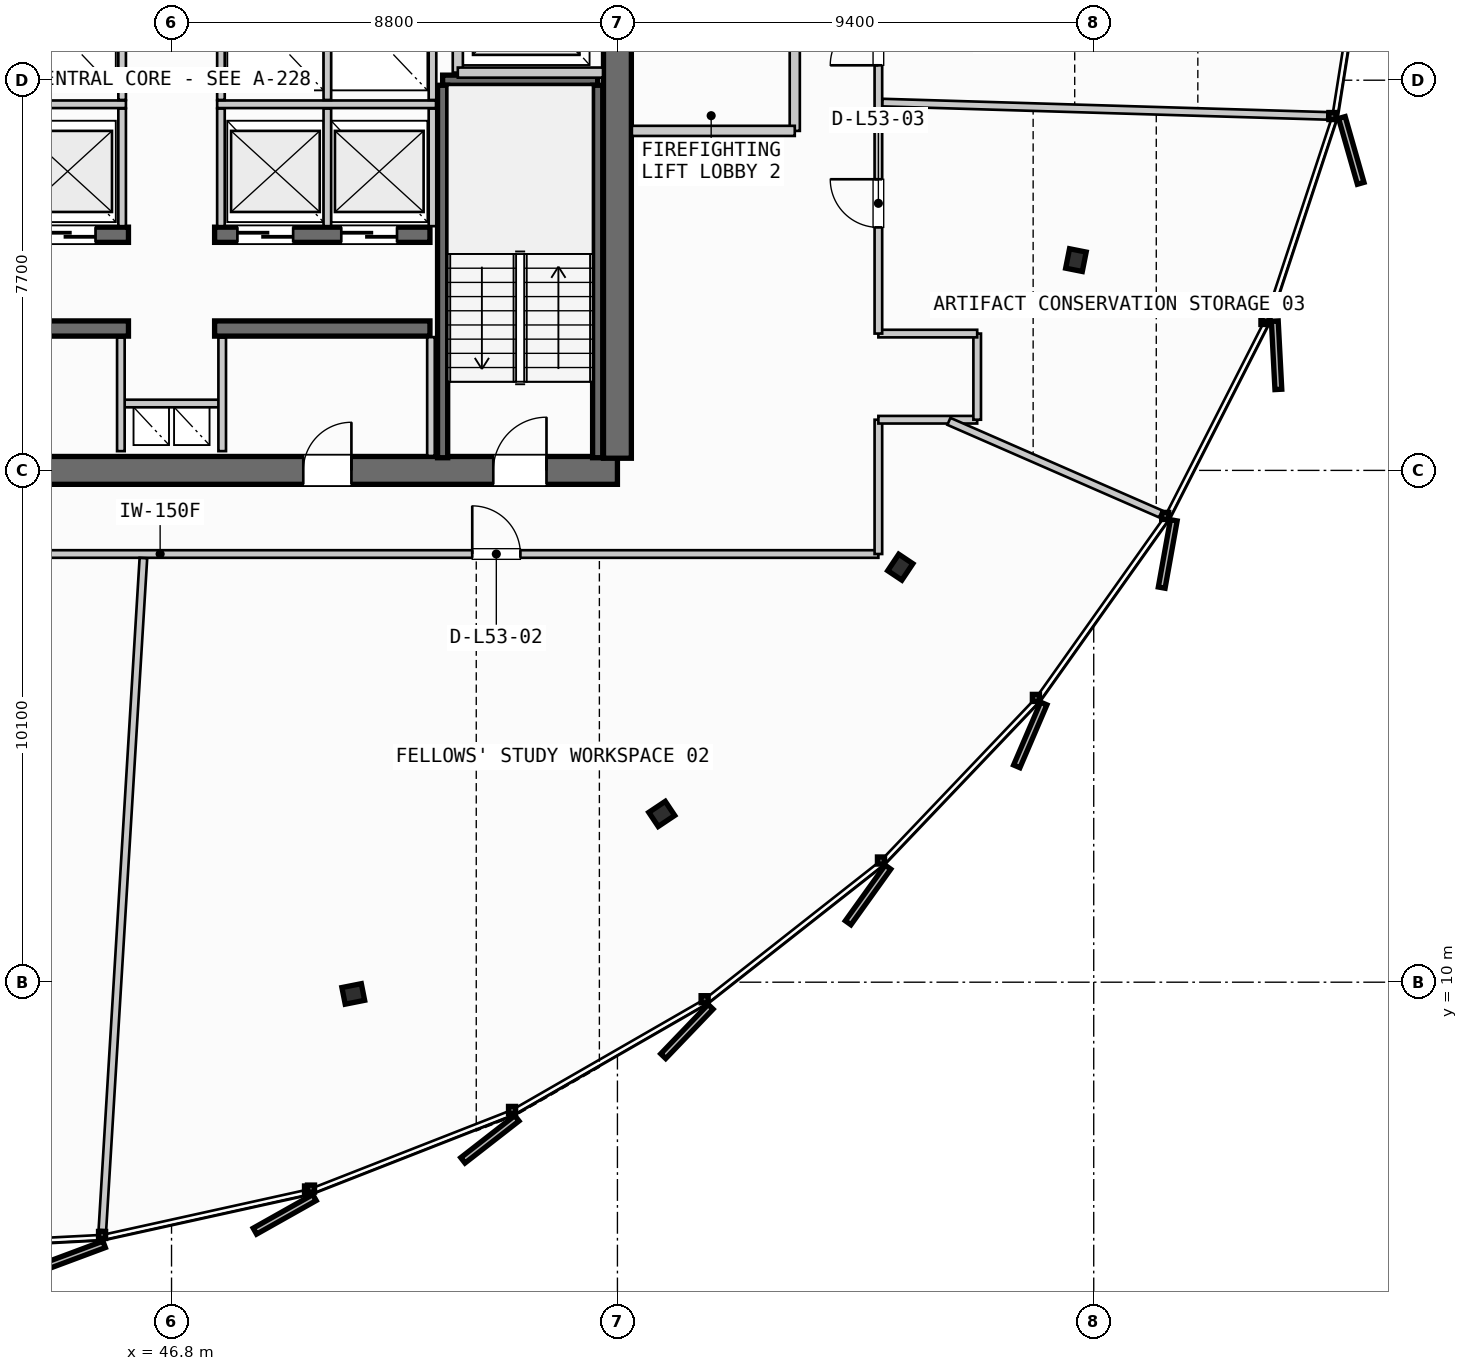
"""IFC4 building model, lengths in metres.
Left out: names, types, materials, properties, quantities, classifications, styles, units other than length and angle.
Written with IfcOpenShell. Run it as: python <this file> out.ifc"""

import sys

from ifc_helpers import new_model, si_unit, direction, frame, frame_2d, origin, origin_2d, place, context, subcontext, project, spatial, rectangle, i_section, extrude, source, transform, mapped, element, fill, save


model = new_model("IFC4")
c1 = context("Model", 3, precision=1e-05, world=origin(), true_north=direction((0.0, 1.0)))
c2 = subcontext(c1, "Body", "Model", "MODEL_VIEW")
j1 = project(units=[si_unit("LENGTHUNIT", "METRE"), si_unit("PLANEANGLEUNIT", "RADIAN")], contexts=[c1])
p1 = place(None, origin())
s1 = spatial("IfcSite", under=j1, at=p1, CompositionType="ELEMENT")
p2 = place(p1, origin())
s2 = spatial("IfcBuilding", under=s1, at=p2, CompositionType="ELEMENT")
p3 = place(p2, frame((0.0, 0.0, 204.4)))
s3 = spatial("IfcBuildingStorey", under=s2, at=p3, CompositionType="ELEMENT", Elevation=204.4)
p4 = place(p3, frame((38.0, 20.1, 0.0), z_axis=(0.0, 0.0, 1.0), x_axis=(1.0, 0.0, 0.0)))
e1 = element("IfcWall", 1, at=p4, inside=s3, PredefinedType="SHEAR", context=c2, shape_type="SweptSolid", body=[
    extrude(rectangle(XDim=17.6, YDim=0.55, at=frame_2d((8.8, 0.0))), origin(), (0.0, 0.0, 1.0), 3.26),
])
p5 = place(p4, frame((1.4, 0.0, 0.0)))
e2 = element("IfcOpeningElement", 2, at=p5, cuts=e1, PredefinedType="OPENING", context=c2, shape_type="SweptSolid", body=[
    extrude(rectangle(XDim=1.05, YDim=2.15, at=frame_2d((0.525, 1.075))), frame((0.0, 0.285, 0.0), z_axis=(0.0, -1.0, 0.0), x_axis=(1.0, 0.0, 0.0)), (0.0, 0.0, 1.0), 0.57),
])
p6 = place(p4, frame((15.15, 0.0, 0.0)))
e3 = element("IfcOpeningElement", 3, at=p6, cuts=e1, PredefinedType="OPENING", context=c2, shape_type="SweptSolid", body=[
    extrude(rectangle(XDim=1.05, YDim=2.15, at=frame_2d((0.525, 1.075))), frame((0.0, 0.285, 0.0), z_axis=(0.0, -1.0, 0.0), x_axis=(1.0, 0.0, 0.0)), (0.0, 0.0, 1.0), 0.57),
])
p7 = place(p4, frame((5.25, 0.0, 0.0)))
e4 = element("IfcOpeningElement", 4, at=p7, cuts=e1, PredefinedType="OPENING", context=c2, shape_type="SweptSolid", body=[
    extrude(rectangle(XDim=0.95, YDim=2.15, at=frame_2d((0.475, 1.075))), frame((0.0, 0.285, 0.0), z_axis=(0.0, -1.0, 0.0), x_axis=(1.0, 0.0, 0.0)), (0.0, 0.0, 1.0), 0.57),
])
p8 = place(p4, frame((11.4, 0.0, 0.0)))
e5 = element("IfcOpeningElement", 5, at=p8, cuts=e1, PredefinedType="OPENING", context=c2, shape_type="SweptSolid", body=[
    extrude(rectangle(XDim=0.95, YDim=2.15, at=frame_2d((0.475, 1.075))), frame((0.0, 0.285, 0.0), z_axis=(0.0, -1.0, 0.0), x_axis=(1.0, 0.0, 0.0)), (0.0, 0.0, 1.0), 0.57),
])
p9 = place(p3, frame((55.6, 20.34, 0.0), z_axis=(0.0, 0.0, 1.0), x_axis=(0.0, 1.0, 0.0)))
e6 = element("IfcWall", 6, at=p9, inside=s3, PredefinedType="SHEAR", context=c2, shape_type="SweptSolid", body=[
    extrude(rectangle(XDim=14.92, YDim=0.55, at=frame_2d((7.46, 0.0))), origin(), (0.0, 0.0, 1.0), 3.26),
])
p10 = place(p9, frame((12.71, 0.0, 0.0)))
e7 = element("IfcOpeningElement", 7, at=p10, cuts=e6, PredefinedType="OPENING", context=c2, shape_type="SweptSolid", body=[
    extrude(rectangle(XDim=1.05, YDim=2.15, at=frame_2d((0.525, 1.075))), frame((0.0, 0.285, 0.0), z_axis=(0.0, -1.0, 0.0), x_axis=(1.0, 0.0, 0.0)), (0.0, 0.0, 1.0), 0.57),
])
p11 = place(p9, frame((8.61, 0.0, 0.0)))
e8 = element("IfcOpeningElement", 8, at=p11, cuts=e6, PredefinedType="OPENING", context=c2, shape_type="SweptSolid", body=[
    extrude(rectangle(XDim=1.1, YDim=2.2, at=frame_2d((0.55, 1.1))), frame((0.0, 0.285, 0.0), z_axis=(0.0, -1.0, 0.0), x_axis=(1.0, 0.0, 0.0)), (0.0, 0.0, 1.0), 0.57),
])
for number, where, z_axis, x_axis in (
    (9, (41.7, 22.9, 0.0), (0.0, 0.0, 1.0), (1.0, 0.0, 0.0)),
    (10, (47.65, 22.9, 0.0), (0.0, 0.0, 1.0), (1.0, 0.0, 0.0)),
):
    element("IfcWall", number, at=place(p3, frame(where, z_axis=z_axis, x_axis=x_axis)), inside=s3, PredefinedType="SHEAR", context=c2, shape_type="SweptSolid", body=[
        extrude(rectangle(XDim=4.25, YDim=0.3, at=frame_2d((2.125, 0.0))), origin(), (0.0, 0.0, 1.0), 3.26),
    ])
p12 = place(p3, frame((41.7, 24.75, 0.0), z_axis=(0.0, 0.0, 1.0), x_axis=(1.0, 0.0, 0.0)))
e11 = element("IfcWall", 11, at=p12, inside=s3, PredefinedType="SHEAR", context=c2, shape_type="SweptSolid", body=[
    extrude(rectangle(XDim=4.25, YDim=0.3, at=frame_2d((2.125, 0.0))), origin(), (0.0, 0.0, 1.0), 3.26),
])
p13 = place(p12, frame((0.45, 0.0, 0.0)))
e12 = element("IfcOpeningElement", 12, at=p13, cuts=e11, PredefinedType="OPENING", context=c2, shape_type="SweptSolid", body=[
    extrude(rectangle(XDim=1.1, YDim=2.2, at=frame_2d((0.55, 1.1))), frame((0.0, 0.16, 0.0), z_axis=(0.0, -1.0, 0.0), x_axis=(1.0, 0.0, 0.0)), (0.0, 0.0, 1.0), 0.32),
])
p14 = place(p12, frame((2.5, 0.0, 0.0)))
e13 = element("IfcOpeningElement", 13, at=p14, cuts=e11, PredefinedType="OPENING", context=c2, shape_type="SweptSolid", body=[
    extrude(rectangle(XDim=1.1, YDim=2.2, at=frame_2d((0.55, 1.1))), frame((0.0, 0.16, 0.0), z_axis=(0.0, -1.0, 0.0), x_axis=(1.0, 0.0, 0.0)), (0.0, 0.0, 1.0), 0.32),
])
p15 = place(p3, frame((47.65, 24.75, 0.0), z_axis=(0.0, 0.0, 1.0), x_axis=(1.0, 0.0, 0.0)))
e14 = element("IfcWall", 14, at=p15, inside=s3, PredefinedType="SHEAR", context=c2, shape_type="SweptSolid", body=[
    extrude(rectangle(XDim=4.25, YDim=0.3, at=frame_2d((2.125, 0.0))), origin(), (0.0, 0.0, 1.0), 3.26),
])
p16 = place(p15, frame((0.45, 0.0, 0.0)))
e15 = element("IfcOpeningElement", 15, at=p16, cuts=e14, PredefinedType="OPENING", context=c2, shape_type="SweptSolid", body=[
    extrude(rectangle(XDim=1.1, YDim=2.2, at=frame_2d((0.55, 1.1))), frame((0.0, 0.16, 0.0), z_axis=(0.0, -1.0, 0.0), x_axis=(1.0, 0.0, 0.0)), (0.0, 0.0, 1.0), 0.32),
])
p17 = place(p15, frame((2.5, 0.0, 0.0)))
e16 = element("IfcOpeningElement", 16, at=p17, cuts=e14, PredefinedType="OPENING", context=c2, shape_type="SweptSolid", body=[
    extrude(rectangle(XDim=1.1, YDim=2.2, at=frame_2d((0.55, 1.1))), frame((0.0, 0.16, 0.0), z_axis=(0.0, -1.0, 0.0), x_axis=(1.0, 0.0, 0.0)), (0.0, 0.0, 1.0), 0.32),
])
m1 = source(origin(), c2, "Body", "SweptSolid", [
    extrude(i_section(OverallWidth=0.391, OverallDepth=0.335, WebThickness=0.023, FlangeThickness=0.034, FilletRadius=0.015, at=origin_2d()), origin(), (0.0, 0.0, 1.0), 3.26),
])
for number, where, z_axis, x_axis in (
    (17, (50.387, 9.769, 0.0), (0.0, 0.0, 1.0), (0.195, -0.981, 0.0)),
    (18, (56.475, 13.321, 0.0), (0.0, 0.0, 1.0), (0.556, -0.831, 0.0)),
    (19, (61.183, 18.19, 0.0), (0.0, 0.0, 1.0), (0.831, -0.556, 0.0)),
    (20, (64.649, 24.25, 0.0), (0.0, 0.0, 1.0), (0.981, -0.195, 0.0)),
):
    element("IfcColumn", number, at=place(p3, frame(where, z_axis=z_axis, x_axis=x_axis)), inside=s3, PredefinedType="COLUMN", context=c2, shape_type="MappedRepresentation", body=[
        mapped(m1, transform((0.0, 0.0, 0.0), scale=1.0)),
    ])
p18 = place(p3, frame((52.15, 27.8, 0.0), z_axis=(0.0, 0.0, 1.0), x_axis=(1.0, 0.0, 0.0)))
e21 = element("IfcWall", 21, at=p18, inside=s3, PredefinedType="SHEAR", context=c2, shape_type="SweptSolid", body=[
    extrude(rectangle(XDim=3.06, YDim=0.2, at=frame_2d((1.53, 0.0))), origin(), (0.0, 0.0, 1.0), 3.26),
])
for number, where, z_axis, x_axis in (
    (22, (55.21, 27.7, 0.0), (0.0, 0.0, 1.0), (0.0, -1.0, 0.0)),
    (23, (52.15, 20.35, 0.0), (0.0, 0.0, 1.0), (0.0, 1.0, 0.0)),
):
    element("IfcWall", number, at=place(p3, frame(where, z_axis=z_axis, x_axis=x_axis)), inside=s3, PredefinedType="SHEAR", context=c2, shape_type="SweptSolid", body=[
        extrude(rectangle(XDim=7.35, YDim=0.2, at=frame_2d((3.675, 0.0))), origin(), (0.0, 0.0, 1.0), 3.26),
    ])
p19 = place(p3, frame((45.8, 21.42, 0.0), z_axis=(0.0, 0.0, 1.0), x_axis=(1.0, 0.0, 0.0)))
e24 = element("IfcWall", 24, at=p19, inside=s3, PredefinedType="PARTITIONING", context=c2, shape_type="SweptSolid", body=[
    extrude(rectangle(XDim=2.0, YDim=0.15, at=frame_2d((1.0, 0.0))), origin(), (0.0, 0.0, 1.0), 2.595),
])
for number, where, z_axis, x_axis in (
    (25, (45.8, 20.48, 0.0), (0.0, 0.0, 1.0), (0.0, 1.0, 0.0)),
    (26, (47.8, 20.48, 0.0), (0.0, 0.0, 1.0), (0.0, 1.0, 0.0)),
):
    element("IfcWall", number, at=place(p3, frame(where, z_axis=z_axis, x_axis=x_axis)), inside=s3, PredefinedType="PARTITIONING", context=c2, shape_type="SweptSolid", body=[
        extrude(rectangle(XDim=2.24, YDim=0.15, at=frame_2d((1.12, 0.0))), origin(), (0.0, 0.0, 1.0), 2.595),
    ])
p20 = place(p3, frame((52.45, 27.95, 0.0), z_axis=(0.0, 0.0, 1.0), x_axis=(0.0, 1.0, 0.0)))
e27 = element("IfcWall", 27, at=p20, inside=s3, PredefinedType="PARTITIONING", context=c2, shape_type="SweptSolid", body=[
    extrude(rectangle(XDim=3.1, YDim=0.2, at=frame_2d((1.55, 0.0))), origin(), (0.0, 0.0, 1.0), 2.595),
])
p21 = place(p3, frame((52.45, 27.95, 0.0), z_axis=(0.0, 0.0, 1.0), x_axis=(1.0, 0.0, 0.0)))
e28 = element("IfcWall", 28, at=p21, inside=s3, PredefinedType="PARTITIONING", context=c2, shape_type="SweptSolid", body=[
    extrude(rectangle(XDim=2.865, YDim=0.2, at=frame_2d((1.433, 0.0))), origin(), (0.0, 0.0, 1.0), 2.595),
])
p22 = place(p3, frame((59.1, 26.8, 0.0), z_axis=(0.0, 0.0, 1.0), x_axis=(0.0, 1.0, 0.0)))
e29 = element("IfcWall", 29, at=p22, inside=s3, PredefinedType="PARTITIONING", context=c2, shape_type="SweptSolid", body=[
    extrude(rectangle(XDim=4.4, YDim=0.2, at=frame_2d((2.2, 0.0))), origin(), (0.0, 0.0, 1.0), 2.595),
])
p23 = place(p22, frame((1.65, 0.0, 0.0)))
e30 = element("IfcOpeningElement", 30, at=p23, cuts=e29, PredefinedType="OPENING", context=c2, shape_type="SweptSolid", body=[
    extrude(rectangle(XDim=1.05, YDim=2.15, at=frame_2d((0.525, 1.075))), frame((0.0, 0.11, 0.0), z_axis=(0.0, -1.0, 0.0), x_axis=(1.0, 0.0, 0.0)), (0.0, 0.0, 1.0), 0.22),
])
p24 = place(p3, frame((55.885, 26.8, 0.0), z_axis=(0.0, 0.0, 1.0), x_axis=(1.0, 0.0, 0.0)))
e31 = element("IfcWall", 31, at=p24, inside=s3, PredefinedType="PARTITIONING", context=c2, shape_type="SweptSolid", body=[
    extrude(rectangle(XDim=3.215, YDim=0.2, at=frame_2d((1.607, 0.0))), origin(), (0.0, 0.0, 1.0), 2.595),
])
p25 = place(p3, frame((51.92, 20.385, 0.0), z_axis=(0.0, 0.0, 1.0), x_axis=(0.0, 1.0, 0.0)))
e32 = element("IfcWall", 32, at=p25, inside=s3, PredefinedType="PARTITIONING", context=c2, shape_type="SweptSolid", body=[
    extrude(rectangle(XDim=2.345, YDim=0.15, at=frame_2d((1.172, 0.0))), origin(), (0.0, 0.0, 1.0), 2.595),
])
p26 = place(p3, frame((41.58, 27.325, 0.0), z_axis=(0.0, 0.0, 1.0), x_axis=(1.0, 0.0, 0.0)))
e33 = element("IfcWall", 33, at=p26, inside=s3, PredefinedType="PARTITIONING", context=c2, shape_type="SweptSolid", body=[
    extrude(rectangle(XDim=4.32, YDim=0.15, at=frame_2d((2.16, 0.0))), origin(), (0.0, 0.0, 1.0), 2.595),
])
p27 = place(p3, frame((47.7, 27.325, 0.0), z_axis=(0.0, 0.0, 1.0), x_axis=(1.0, 0.0, 0.0)))
e34 = element("IfcWall", 34, at=p27, inside=s3, PredefinedType="PARTITIONING", context=c2, shape_type="SweptSolid", body=[
    extrude(rectangle(XDim=4.32, YDim=0.15, at=frame_2d((2.16, 0.0))), origin(), (0.0, 0.0, 1.0), 2.595),
])
for number, where, z_axis, x_axis in (
    (35, (45.825, 24.92, 0.0), (0.0, 0.0, 1.0), (0.0, 1.0, 0.0)),
    (36, (47.775, 24.92, 0.0), (0.0, 0.0, 1.0), (0.0, 1.0, 0.0)),
    (37, (49.875, 24.92, 0.0), (0.0, 0.0, 1.0), (0.0, 1.0, 0.0)),
    (38, (51.95, 24.92, 0.0), (0.0, 0.0, 1.0), (0.0, 1.0, 0.0)),
):
    element("IfcWall", number, at=place(p3, frame(where, z_axis=z_axis, x_axis=x_axis)), inside=s3, PredefinedType="PARTITIONING", context=c2, shape_type="SweptSolid", body=[
        extrude(rectangle(XDim=2.32, YDim=0.15, at=frame_2d((1.16, 0.0))), origin(), (0.0, 0.0, 1.0), 2.595),
    ])
for number, where, z_axis, x_axis in (
    (39, (45.825, 27.41, 0.0), (0.0, 0.0, 1.0), (0.0, 1.0, 0.0)),
    (40, (47.775, 27.41, 0.0), (0.0, 0.0, 1.0), (0.0, 1.0, 0.0)),
    (41, (49.875, 27.41, 0.0), (0.0, 0.0, 1.0), (0.0, 1.0, 0.0)),
    (42, (51.95, 27.41, 0.0), (0.0, 0.0, 1.0), (0.0, 1.0, 0.0)),
):
    element("IfcWall", number, at=place(p3, frame(where, z_axis=z_axis, x_axis=x_axis)), inside=s3, PredefinedType="PARTITIONING", context=c2, shape_type="SweptSolid", body=[
        extrude(rectangle(XDim=2.27, YDim=0.15, at=frame_2d((1.135, 0.0))), origin(), (0.0, 0.0, 1.0), 2.595),
    ])
p28 = place(p3, frame((32.4, 18.45, 0.0), z_axis=(0.0, 0.0, 1.0), x_axis=(1.0, 0.0, 0.0)))
e43 = element("IfcWall", 43, at=p28, inside=s3, PredefinedType="PARTITIONING", context=c2, shape_type="SweptSolid", body=[
    extrude(rectangle(XDim=28.35, YDim=0.15, at=frame_2d((14.175, 0.0))), origin(), (0.0, 0.0, 1.0), 2.595),
])
p29 = place(p28, frame((6.74, 0.0, 0.0)))
e44 = element("IfcOpeningElement", 44, at=p29, cuts=e43, PredefinedType="OPENING", context=c2, shape_type="SweptSolid", body=[
    extrude(rectangle(XDim=0.95, YDim=2.15, at=frame_2d((0.475, 1.075))), frame((0.0, 0.085, 0.0), z_axis=(0.0, -1.0, 0.0), x_axis=(1.0, 0.0, 0.0)), (0.0, 0.0, 1.0), 0.17),
])
p30 = place(p28, frame((20.335, 0.0, 0.0)))
e45 = element("IfcOpeningElement", 45, at=p30, cuts=e43, PredefinedType="OPENING", context=c2, shape_type="SweptSolid", body=[
    extrude(rectangle(XDim=0.95, YDim=2.15, at=frame_2d((0.475, 1.075))), frame((0.0, 0.085, 0.0), z_axis=(0.0, -1.0, 0.0), x_axis=(1.0, 0.0, 0.0)), (0.0, 0.0, 1.0), 0.17),
])
p31 = place(p3, frame((60.75, 18.45, 0.0), z_axis=(0.0, 0.0, 1.0), x_axis=(0.0, 1.0, 0.0)))
e46 = element("IfcWall", 46, at=p31, inside=s3, PredefinedType="PARTITIONING", context=c2, shape_type="SweptSolid", body=[
    extrude(rectangle(XDim=2.65, YDim=0.15, at=frame_2d((1.325, 0.0))), origin(), (0.0, 0.0, 1.0), 2.595),
])
p32 = place(p3, frame((60.75, 21.1, 0.0), z_axis=(0.0, 0.0, 1.0), x_axis=(1.0, 0.0, 0.0)))
e47 = element("IfcWall", 47, at=p32, inside=s3, PredefinedType="PARTITIONING", context=c2, shape_type="SweptSolid", body=[
    extrude(rectangle(XDim=1.95, YDim=0.15, at=frame_2d((0.975, 0.0))), origin(), (0.0, 0.0, 1.0), 2.595),
])
p33 = place(p3, frame((62.7, 21.1, 0.0), z_axis=(0.0, 0.0, 1.0), x_axis=(0.0, 1.0, 0.0)))
e48 = element("IfcWall", 48, at=p33, inside=s3, PredefinedType="PARTITIONING", context=c2, shape_type="SweptSolid", body=[
    extrude(rectangle(XDim=1.7, YDim=0.15, at=frame_2d((0.85, 0.0))), origin(), (0.0, 0.0, 1.0), 2.595),
])
p34 = place(p3, frame((62.7, 22.8, 0.0), z_axis=(0.0, 0.0, 1.0), x_axis=(-1.0, 0.0, 0.0)))
e49 = element("IfcWall", 49, at=p34, inside=s3, PredefinedType="PARTITIONING", context=c2, shape_type="SweptSolid", body=[
    extrude(rectangle(XDim=1.95, YDim=0.15, at=frame_2d((0.975, 0.0))), origin(), (0.0, 0.0, 1.0), 2.595),
])
p35 = place(p3, frame((60.75, 22.8, 0.0), z_axis=(0.0, 0.0, 1.0), x_axis=(0.0, 1.0, 0.0)))
e50 = element("IfcWall", 50, at=p35, inside=s3, PredefinedType="PARTITIONING", context=c2, shape_type="SweptSolid", body=[
    extrude(rectangle(XDim=10.0, YDim=0.15, at=frame_2d((5.0, 0.0))), origin(), (0.0, 0.0, 1.0), 2.595),
])
p36 = place(p35, frame((2.095, 0.0, 0.0)))
e51 = element("IfcOpeningElement", 51, at=p36, cuts=e50, PredefinedType="OPENING", context=c2, shape_type="SweptSolid", body=[
    extrude(rectangle(XDim=0.95, YDim=2.15, at=frame_2d((0.475, 1.075))), frame((0.0, 0.085, 0.0), z_axis=(0.0, -1.0, 0.0), x_axis=(1.0, 0.0, 0.0)), (0.0, 0.0, 1.0), 0.17),
])
p37 = place(p35, frame((5.294, 0.0, 0.0)))
e52 = element("IfcOpeningElement", 52, at=p37, cuts=e50, PredefinedType="OPENING", context=c2, shape_type="SweptSolid", body=[
    extrude(rectangle(XDim=0.95, YDim=2.15, at=frame_2d((0.475, 1.075))), frame((0.0, 0.085, 0.0), z_axis=(0.0, -1.0, 0.0), x_axis=(1.0, 0.0, 0.0)), (0.0, 0.0, 1.0), 0.17),
])
p38 = place(p35, frame((7.722, 0.0, 0.0)))
e53 = element("IfcOpeningElement", 53, at=p38, cuts=e50, PredefinedType="OPENING", context=c2, shape_type="SweptSolid", body=[
    extrude(rectangle(XDim=0.95, YDim=2.15, at=frame_2d((0.475, 1.075))), frame((0.0, 0.085, 0.0), z_axis=(0.0, -1.0, 0.0), x_axis=(1.0, 0.0, 0.0)), (0.0, 0.0, 1.0), 0.17),
])
p39 = place(p3, frame((46.245, 18.37, 0.0), z_axis=(0.0, 0.0, 1.0), x_axis=(-0.060966188307, -0.998139831829, 0.0)))
e54 = element("IfcWall", 54, at=p39, inside=s3, PredefinedType="PARTITIONING", context=c2, shape_type="SweptSolid", body=[
    extrude(rectangle(XDim=13.283, YDim=0.15, at=frame_2d((6.642, 0.0))), origin(), (0.0, 0.0, 1.0), 2.595),
])
p40 = place(p3, frame((62.142, 21.068, 0.0), z_axis=(0.0, 0.0, 1.0), x_axis=(0.916248259301, -0.400610942597, 0.0)))
e55 = element("IfcWall", 55, at=p40, inside=s3, PredefinedType="PARTITIONING", context=c2, shape_type="SweptSolid", body=[
    extrude(rectangle(XDim=4.559, YDim=0.15, at=frame_2d((2.28, 0.0))), origin(), (0.0, 0.0, 1.0), 2.595),
])
p41 = place(p3, frame((60.83, 27.359, 0.0), z_axis=(0.0, 0.0, 1.0), x_axis=(0.999552707867, -0.02990625681, 0.0)))
e56 = element("IfcWall", 56, at=p41, inside=s3, PredefinedType="PARTITIONING", context=c2, shape_type="SweptSolid", body=[
    extrude(rectangle(XDim=8.784, YDim=0.15, at=frame_2d((4.392, 0.0))), origin(), (0.0, 0.0, 1.0), 2.595),
])
m2 = source(origin(), c2, "Body", "SweptSolid", [
    extrude(rectangle(XDim=1.05, YDim=2.15, at=frame_2d((0.525, 1.075))), frame((0.0, 0.025, 0.0), z_axis=(0.0, -1.0, 0.0), x_axis=(1.0, 0.0, 0.0)), (0.0, 0.0, 1.0), 0.05),
])
p42 = place(p6, origin())
e57 = element("IfcDoor", 57, at=p42, inside=s3, OperationType="SINGLE_SWING_RIGHT", PredefinedType="DOOR", context=c2, shape_type="MappedRepresentation", body=[
    mapped(m2, transform((0.0, 0.0, 0.0), scale=1.0)),
])
fill(e3, e57)
m3 = source(origin(), c2, "Body", "SweptSolid", [
    extrude(rectangle(XDim=0.95, YDim=2.15, at=frame_2d((0.475, 1.075))), frame((0.0, 0.025, 0.0), z_axis=(0.0, -1.0, 0.0), x_axis=(1.0, 0.0, 0.0)), (0.0, 0.0, 1.0), 0.05),
])
p43 = place(p8, origin())
e58 = element("IfcDoor", 58, at=p43, inside=s3, OperationType="SINGLE_SWING_RIGHT", PredefinedType="DOOR", context=c2, shape_type="MappedRepresentation", body=[
    mapped(m3, transform((0.0, 0.0, 0.0), scale=1.0)),
])
fill(e5, e58)
m4 = source(origin(), c2, "Body", "SweptSolid", [
    extrude(rectangle(XDim=1.1, YDim=2.2, at=frame_2d((0.55, 1.1))), frame((0.0, 0.025, 0.0), z_axis=(0.0, -1.0, 0.0), x_axis=(1.0, 0.0, 0.0)), (0.0, 0.0, 1.0), 0.05),
])
p44 = place(p14, origin())
e59 = element("IfcDoor", 59, at=p44, inside=s3, OperationType="SLIDING_TO_RIGHT", PredefinedType="DOOR", context=c2, shape_type="MappedRepresentation", body=[
    mapped(m4, transform((0.0, 0.0, 0.0), scale=1.0)),
])
fill(e13, e59)
p45 = place(p16, origin())
e60 = element("IfcDoor", 60, at=p45, inside=s3, OperationType="SLIDING_TO_RIGHT", PredefinedType="DOOR", context=c2, shape_type="MappedRepresentation", body=[
    mapped(m4, transform((0.0, 0.0, 0.0), scale=1.0)),
])
fill(e15, e60)
p46 = place(p17, origin())
e61 = element("IfcDoor", 61, at=p46, inside=s3, OperationType="SLIDING_TO_RIGHT", PredefinedType="DOOR", context=c2, shape_type="MappedRepresentation", body=[
    mapped(m4, transform((0.0, 0.0, 0.0), scale=1.0)),
])
fill(e16, e61)
p47 = place(p30, origin())
e62 = element("IfcDoor", 62, at=p47, inside=s3, OperationType="SINGLE_SWING_LEFT", PredefinedType="DOOR", context=c2, shape_type="MappedRepresentation", body=[
    mapped(m3, transform((0.0, 0.0, 0.0), scale=1.0)),
])
fill(e45, e62)
p48 = place(p36, origin())
e63 = element("IfcDoor", 63, at=p48, inside=s3, OperationType="SINGLE_SWING_RIGHT", PredefinedType="DOOR", context=c2, shape_type="MappedRepresentation", body=[
    mapped(m3, transform((0.0, 0.0, 0.0), scale=1.0)),
])
fill(e51, e63)
p49 = place(p37, origin())
e64 = element("IfcDoor", 64, at=p49, inside=s3, OperationType="SINGLE_SWING_LEFT", PredefinedType="DOOR", context=c2, shape_type="MappedRepresentation", body=[
    mapped(m3, transform((0.0, 0.0, 0.0), scale=1.0)),
])
fill(e52, e64)
save(model, sys.argv[1])
